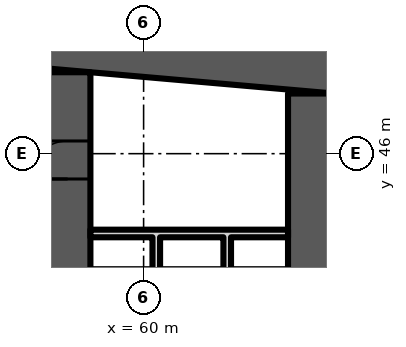
"""IFC4 building model, lengths in metres.
Left out: names, types, materials, properties, quantities, classifications, styles, units other than length and angle.
Written with IfcOpenShell. Run it as: python <this file> out.ifc"""

import sys

from ifc_helpers import new_model, si_unit, direction, frame, frame_2d, origin, place, context, subcontext, project, spatial, polyline, rectangle, outline, extrude, element, fill, save


model = new_model("IFC4")
c1 = context("Model", 3, precision=1e-05, world=origin(), true_north=direction((0.0, 1.0)))
c2 = subcontext(c1, "Body", "Model", "MODEL_VIEW")
j1 = project(units=[si_unit("LENGTHUNIT", "METRE"), si_unit("PLANEANGLEUNIT", "RADIAN")], contexts=[c1])
p1 = place(None, origin())
s1 = spatial("IfcSite", under=j1, at=p1, CompositionType="ELEMENT")
p2 = place(p1, origin())
s2 = spatial("IfcBuilding", under=s1, at=p2, CompositionType="ELEMENT")
p3 = place(p2, frame((0.0, 0.0, 66.7)))
s3 = spatial("IfcBuildingStorey", under=s2, at=p3, CompositionType="ELEMENT", Elevation=66.7)
p4 = place(p3, origin())
e1 = element("IfcWall", 1, at=p4, inside=s3, PredefinedType="SHEAR", context=c2, shape_type="SweptSolid", body=[
    extrude(outline(polyline([(9.0, 47.583), (37.0, 50.032), (65.0, 47.583), (65.0, 48.787), (37.0, 51.237), (9.0, 48.787), (9.0, 47.583)])), origin(), (0.0, 0.0, 1.0), 3.6),
])
p5 = place(p3, frame((58.0, 35.2, 0.0), z_axis=(0.0, 0.0, 1.0), x_axis=(0.0, 1.0, 0.0)))
e2 = element("IfcWall", 2, at=p5, inside=s3, PredefinedType="SHEAR", context=c2, shape_type="SweptSolid", body=[
    extrude(rectangle(XDim=12.943, YDim=1.2, at=frame_2d((6.471, 0.0))), origin(), (0.0, 0.0, 1.0), 3.6),
])
p6 = place(p5, frame((10.134, 0.0, 0.0)))
e3 = element("IfcOpeningElement", 3, at=p6, cuts=e2, PredefinedType="OPENING", context=c2, shape_type="SweptSolid", body=[
    extrude(rectangle(XDim=1.0, YDim=2.1, at=frame_2d((0.5, 1.05))), frame((0.0, 0.61, 0.0), z_axis=(0.0, -1.0, 0.0), x_axis=(1.0, 0.0, 0.0)), (0.0, 0.0, 1.0), 1.22),
])
p7 = place(p5, frame((3.2, 0.0, 0.0)))
e4 = element("IfcOpeningElement", 4, at=p7, cuts=e2, PredefinedType="OPENING", context=c2, shape_type="SweptSolid", body=[
    extrude(rectangle(XDim=1.1, YDim=2.1, at=frame_2d((0.55, 1.05))), frame((0.0, 0.61, 0.0), z_axis=(0.0, -1.0, 0.0), x_axis=(1.0, 0.0, 0.0)), (0.0, 0.0, 1.0), 1.22),
])
p8 = place(p3, frame((64.4, 35.2, 0.0), z_axis=(0.0, 0.0, 1.0), x_axis=(0.0, 1.0, 0.0)))
e5 = element("IfcWall", 5, at=p8, inside=s3, PredefinedType="SHEAR", context=c2, shape_type="SweptSolid", body=[
    extrude(rectangle(XDim=12.383, YDim=1.2, at=frame_2d((6.191, 0.0))), origin(), (0.0, 0.0, 1.0), 3.6),
])
p9 = place(p3, frame((0.0, 0.0, -0.0)))
e6 = element("IfcWall", 6, at=p9, inside=s3, PredefinedType="PARTITIONING", context=c2, shape_type="SweptSolid", body=[
    extrude(outline(polyline([(60.433, 40.8), (60.233, 40.8), (60.233, 43.8), (58.6, 43.8), (58.6, 44.0), (63.8, 44.0), (63.8, 43.8), (62.3, 43.8), (62.3, 40.8), (62.1, 40.8), (62.1, 43.8), (60.433, 43.8), (60.433, 40.8)])), origin(), (0.0, 0.0, 1.0), 3.2),
])
p10 = place(p6, origin())
e7 = element("IfcDoor", 7, at=p10, inside=s3, OperationType="SINGLE_SWING_LEFT", PredefinedType="DOOR", context=c2, shape_type="SweptSolid", body=[
    extrude(rectangle(XDim=1.0, YDim=2.1, at=frame_2d((0.5, 1.05))), frame((0.0, 0.6, 0.0), z_axis=(0.0, -1.0, 0.0), x_axis=(1.0, 0.0, 0.0)), (0.0, 0.0, 1.0), 1.199),
])
fill(e3, e7)
save(model, sys.argv[1])
